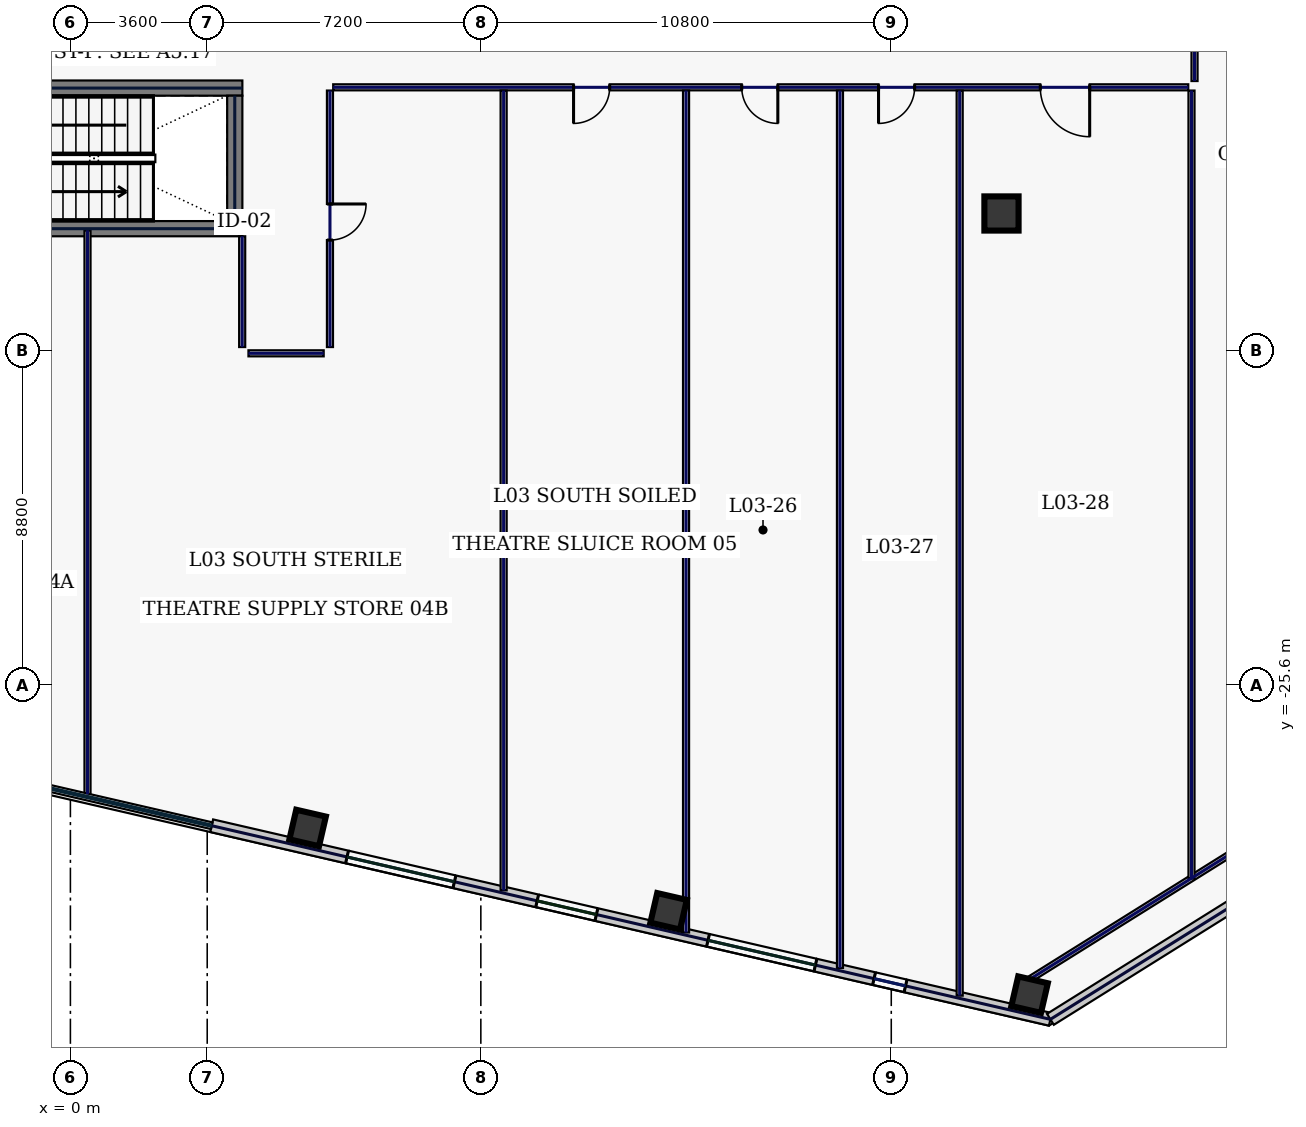
"""IFC4 building model, lengths in metres.
Left out: names, types, materials, properties, quantities, classifications, styles, units other than length and angle.
Written with IfcOpenShell. Run it as: python <this file> out.ifc"""

import sys

from ifc_helpers import new_model, si_unit, direction, frame, frame_2d, origin, origin_2d, place, context, subcontext, project, spatial, rectangle, hollow_rectangle, extrude, element, fill, save


model = new_model("IFC4")
c1 = context("Model", 3, precision=1e-05, world=origin(), true_north=direction((0.0, 1.0)))
c2 = subcontext(c1, "Body", "Model", "MODEL_VIEW")
j1 = project(units=[si_unit("LENGTHUNIT", "METRE"), si_unit("PLANEANGLEUNIT", "RADIAN")], contexts=[c1])
p1 = place(None, origin())
s1 = spatial("IfcSite", under=j1, at=p1, CompositionType="ELEMENT")
p2 = place(p1, origin())
s2 = spatial("IfcBuilding", under=s1, at=p2, CompositionType="ELEMENT")
p3 = place(p2, frame((0.0, 0.0, 18.4)))
s3 = spatial("IfcBuildingStorey", under=s2, at=p3, CompositionType="ELEMENT", Elevation=18.4)
p4 = place(p3, frame((-4.525, -13.6, 0.0), z_axis=(0.0, 0.0, 1.0), x_axis=(1.0, 0.0, 0.0)))
e1 = element("IfcWall", 1, at=p4, inside=s3, PredefinedType="SHEAR", context=c2, shape_type="SweptSolid", body=[
    extrude(rectangle(XDim=9.05, YDim=0.4, at=frame_2d((4.525, 0.0))), origin(), (0.0, 0.0, 1.0), 4.7),
])
p5 = place(p3, frame((-4.525, -9.9, 0.0), z_axis=(0.0, 0.0, 1.0), x_axis=(1.0, 0.0, 0.0)))
e2 = element("IfcWall", 2, at=p5, inside=s3, PredefinedType="SHEAR", context=c2, shape_type="SweptSolid", body=[
    extrude(rectangle(XDim=9.05, YDim=0.4, at=frame_2d((4.525, 0.0))), origin(), (0.0, 0.0, 1.0), 4.7),
])
p6 = place(p5, frame((0.25, 0.0, 0.0)))
e3 = element("IfcOpeningElement", 3, at=p6, cuts=e2, PredefinedType="OPENING", context=c2, shape_type="SweptSolid", body=[
    extrude(rectangle(XDim=1.1, YDim=2.2, at=frame_2d((0.55, 1.1))), frame((0.0, 0.21, 0.0), z_axis=(0.0, -1.0, 0.0), x_axis=(1.0, 0.0, 0.0)), (0.0, 0.0, 1.0), 0.42),
])
p7 = place(p3, frame((4.325, -13.4, 0.0), z_axis=(0.0, 0.0, 1.0), x_axis=(0.0, 1.0, 0.0)))
e4 = element("IfcWall", 4, at=p7, inside=s3, PredefinedType="SHEAR", context=c2, shape_type="SweptSolid", body=[
    extrude(rectangle(XDim=3.3, YDim=0.4, at=frame_2d((1.65, 0.0))), origin(), (0.0, 0.0, 1.0), 4.7),
])
p8 = place(p3, frame((24.5, -13.2, 0.0), z_axis=(0.0, 0.0, 1.0), x_axis=(1.0, 0.0, 0.0)))
e5 = element("IfcColumn", 5, at=p8, inside=s3, PredefinedType="COLUMN", context=c2, shape_type="SweptSolid", body=[
    extrude(hollow_rectangle(XDim=0.9, YDim=0.9, WallThickness=0.04, at=origin_2d()), origin(), (0.0, 0.0, 1.0), 4.7),
])
for number, where, z_axis, x_axis in (
    (6, (6.242, -29.371, 0.0), (0.0, 0.0, 1.0), (0.974, -0.225, 0.0)),
    (7, (15.741, -31.564, 0.0), (0.0, 0.0, 1.0), (0.974, -0.225, 0.0)),
    (8, (25.24, -33.757, 0.0), (0.0, 0.0, 1.0), (0.974, -0.225, 0.0)),
):
    element("IfcColumn", number, at=place(p3, frame(where, z_axis=z_axis, x_axis=x_axis)), inside=s3, PredefinedType="COLUMN", context=c2, shape_type="SweptSolid", body=[
        extrude(hollow_rectangle(XDim=0.8, YDim=0.8, WallThickness=0.036, at=origin_2d()), origin(), (0.0, 0.0, 1.0), 4.7),
    ])
p9 = place(p3, frame((3.717, -29.311, 0.0), z_axis=(0.0, 0.0, 1.0), x_axis=(0.97436993772, -0.224951604723, 0.0)))
e9 = element("IfcWall", 9, at=p9, inside=s3, PredefinedType="STANDARD", context=c2, shape_type="SweptSolid", body=[
    extrude(rectangle(XDim=22.651, YDim=0.34, at=frame_2d((11.326, 0.0))), origin(), (0.0, 0.0, 1.0), 4.7),
])
p10 = place(p9, frame((3.656, 0.0, 0.85)))
e10 = element("IfcOpeningElement", 10, at=p10, cuts=e9, PredefinedType="OPENING", context=c2, shape_type="SweptSolid", body=[
    extrude(rectangle(XDim=2.9, YDim=2.3, at=frame_2d((1.45, 1.15))), frame((0.0, 0.18, 0.0), z_axis=(0.0, -1.0, 0.0), x_axis=(1.0, 0.0, 0.0)), (0.0, 0.0, 1.0), 0.36),
])
p11 = place(p9, frame((8.791, 0.0, 0.22)))
e11 = element("IfcOpeningElement", 11, at=p11, cuts=e9, PredefinedType="OPENING", context=c2, shape_type="SweptSolid", body=[
    extrude(rectangle(XDim=1.6, YDim=1.2, at=frame_2d((0.8, 0.6))), frame((0.0, 0.18, 0.0), z_axis=(0.0, -1.0, 0.0), x_axis=(1.0, 0.0, 0.0)), (0.0, 0.0, 1.0), 0.36),
])
p12 = place(p9, frame((13.405, 0.0, 0.85)))
e12 = element("IfcOpeningElement", 12, at=p12, cuts=e9, PredefinedType="OPENING", context=c2, shape_type="SweptSolid", body=[
    extrude(rectangle(XDim=2.9, YDim=2.3, at=frame_2d((1.45, 1.15))), frame((0.0, 0.18, 0.0), z_axis=(0.0, -1.0, 0.0), x_axis=(1.0, 0.0, 0.0)), (0.0, 0.0, 1.0), 0.36),
])
p13 = place(p9, frame((17.889, 0.0, 0.85)))
e13 = element("IfcOpeningElement", 13, at=p13, cuts=e9, PredefinedType="OPENING", context=c2, shape_type="SweptSolid", body=[
    extrude(rectangle(XDim=0.85, YDim=1.85, at=frame_2d((0.425, 0.925))), frame((0.0, 0.18, 0.0), z_axis=(0.0, -1.0, 0.0), x_axis=(1.0, 0.0, 0.0)), (0.0, 0.0, 1.0), 0.36),
])
p14 = place(p3, frame((25.788, -34.406, 0.0), z_axis=(0.0, 0.0, 1.0), x_axis=(0.848046504656, 0.529921811158, 0.0)))
e14 = element("IfcWall", 14, at=p14, inside=s3, PredefinedType="STANDARD", context=c2, shape_type="SweptSolid", body=[
    extrude(rectangle(XDim=7.113, YDim=0.34, at=frame_2d((3.557, 0.0))), origin(), (0.0, 0.0, 1.0), 4.7),
])
p15 = place(p3, frame((25.06, -33.468, 0.0), z_axis=(0.0, 0.0, 1.0), x_axis=(0.848043064089, 0.529927317139, 0.0)))
e15 = element("IfcWall", 15, at=p15, inside=s3, PredefinedType="PARTITIONING", context=c2, shape_type="SweptSolid", body=[
    extrude(rectangle(XDim=7.354, YDim=0.16, at=frame_2d((3.677, 0.0))), origin(), (0.0, 0.0, 1.0), 4.7),
])
p16 = place(p3, frame((29.58, 9.715, 0.0), z_axis=(0.0, 0.0, 1.0), x_axis=(0.0, -1.0, 0.0)))
e16 = element("IfcWall", 16, at=p16, inside=s3, PredefinedType="PARTITIONING", context=c2, shape_type="SweptSolid", body=[
    extrude(rectangle(XDim=19.43, YDim=0.16, at=frame_2d((9.715, 0.0))), origin(), (0.0, 0.0, 1.0), 4.7),
])
p17 = place(p16, frame((16.631, 0.0, 0.0)))
e17 = element("IfcOpeningElement", 17, at=p17, cuts=e16, PredefinedType="OPENING", context=c2, shape_type="SweptSolid", body=[
    extrude(rectangle(XDim=0.95, YDim=2.2, at=frame_2d((0.475, 1.1))), frame((0.0, 0.09, 0.0), z_axis=(0.0, -1.0, 0.0), x_axis=(1.0, 0.0, 0.0)), (0.0, 0.0, 1.0), 0.18),
])
p18 = place(p16, frame((11.925, 0.0, 0.0)))
e18 = element("IfcOpeningElement", 18, at=p18, cuts=e16, PredefinedType="OPENING", context=c2, shape_type="SweptSolid", body=[
    extrude(rectangle(XDim=0.95, YDim=2.2, at=frame_2d((0.475, 1.1))), frame((0.0, 0.09, 0.0), z_axis=(0.0, -1.0, 0.0), x_axis=(1.0, 0.0, 0.0)), (0.0, 0.0, 1.0), 0.18),
])
p19 = place(p16, frame((6.725, 0.0, 0.0)))
e19 = element("IfcOpeningElement", 19, at=p19, cuts=e16, PredefinedType="OPENING", context=c2, shape_type="SweptSolid", body=[
    extrude(rectangle(XDim=0.95, YDim=2.2, at=frame_2d((0.475, 1.1))), frame((0.0, 0.09, 0.0), z_axis=(0.0, -1.0, 0.0), x_axis=(1.0, 0.0, 0.0)), (0.0, 0.0, 1.0), 0.18),
])
p20 = place(p16, frame((2.019, 0.0, 0.0)))
e20 = element("IfcOpeningElement", 20, at=p20, cuts=e16, PredefinedType="OPENING", context=c2, shape_type="SweptSolid", body=[
    extrude(rectangle(XDim=0.95, YDim=2.2, at=frame_2d((0.475, 1.1))), frame((0.0, 0.09, 0.0), z_axis=(0.0, -1.0, 0.0), x_axis=(1.0, 0.0, 0.0)), (0.0, 0.0, 1.0), 0.18),
])
p21 = place(p3, frame((29.415, -9.88, 0.0), z_axis=(0.0, 0.0, 1.0), x_axis=(-1.0, 0.0, 0.0)))
e21 = element("IfcWall", 21, at=p21, inside=s3, PredefinedType="PARTITIONING", context=c2, shape_type="SweptSolid", body=[
    extrude(rectangle(XDim=22.5, YDim=0.16, at=frame_2d((11.25, 0.0))), origin(), (0.0, 0.0, 1.0), 4.7),
])
p22 = place(p21, frame((15.225, 0.0, 0.0)))
e22 = element("IfcOpeningElement", 22, at=p22, cuts=e21, PredefinedType="OPENING", context=c2, shape_type="SweptSolid", body=[
    extrude(rectangle(XDim=0.95, YDim=2.2, at=frame_2d((0.475, 1.1))), frame((0.0, 0.09, 0.0), z_axis=(0.0, -1.0, 0.0), x_axis=(1.0, 0.0, 0.0)), (0.0, 0.0, 1.0), 0.18),
])
p23 = place(p21, frame((10.8, 0.0, 0.0)))
e23 = element("IfcOpeningElement", 23, at=p23, cuts=e21, PredefinedType="OPENING", context=c2, shape_type="SweptSolid", body=[
    extrude(rectangle(XDim=0.95, YDim=2.2, at=frame_2d((0.475, 1.1))), frame((0.0, 0.09, 0.0), z_axis=(0.0, -1.0, 0.0), x_axis=(1.0, 0.0, 0.0)), (0.0, 0.0, 1.0), 0.18),
])
p24 = place(p21, frame((7.2, 0.0, 0.0)))
e24 = element("IfcOpeningElement", 24, at=p24, cuts=e21, PredefinedType="OPENING", context=c2, shape_type="SweptSolid", body=[
    extrude(rectangle(XDim=0.95, YDim=2.2, at=frame_2d((0.475, 1.1))), frame((0.0, 0.09, 0.0), z_axis=(0.0, -1.0, 0.0), x_axis=(1.0, 0.0, 0.0)), (0.0, 0.0, 1.0), 0.18),
])
p25 = place(p21, frame((2.594, 0.0, 0.0)))
e25 = element("IfcOpeningElement", 25, at=p25, cuts=e21, PredefinedType="OPENING", context=c2, shape_type="SweptSolid", body=[
    extrude(rectangle(XDim=1.3, YDim=2.2, at=frame_2d((0.65, 1.1))), frame((0.0, 0.09, 0.0), z_axis=(0.0, -1.0, 0.0), x_axis=(1.0, 0.0, 0.0)), (0.0, 0.0, 1.0), 0.18),
])
p26 = place(p3, frame((6.83, -9.965, 0.0), z_axis=(0.0, 0.0, 1.0), x_axis=(0.0, -1.0, 0.0)))
e26 = element("IfcWall", 26, at=p26, inside=s3, PredefinedType="PARTITIONING", context=c2, shape_type="SweptSolid", body=[
    extrude(rectangle(XDim=6.75, YDim=0.16, at=frame_2d((3.375, 0.0))), origin(), (0.0, 0.0, 1.0), 4.7),
])
p27 = place(p26, frame((2.985, 0.0, 0.0)))
e27 = element("IfcOpeningElement", 27, at=p27, cuts=e26, PredefinedType="OPENING", context=c2, shape_type="SweptSolid", body=[
    extrude(rectangle(XDim=0.95, YDim=2.2, at=frame_2d((0.475, 1.1))), frame((0.0, 0.09, 0.0), z_axis=(0.0, -1.0, 0.0), x_axis=(1.0, 0.0, 0.0)), (0.0, 0.0, 1.0), 0.18),
])
p28 = place(p3, frame((6.665, -16.88, 0.0), z_axis=(0.0, 0.0, 1.0), x_axis=(-1.0, 0.0, 0.0)))
e28 = element("IfcWall", 28, at=p28, inside=s3, PredefinedType="PARTITIONING", context=c2, shape_type="SweptSolid", body=[
    extrude(rectangle(XDim=1.98, YDim=0.16, at=frame_2d((0.99, 0.0))), origin(), (0.0, 0.0, 1.0), 4.7),
])
p29 = place(p3, frame((4.52, -16.715, 0.0), z_axis=(0.0, 0.0, 1.0), x_axis=(0.0, 1.0, 0.0)))
e29 = element("IfcWall", 29, at=p29, inside=s3, PredefinedType="PARTITIONING", context=c2, shape_type="SweptSolid", body=[
    extrude(rectangle(XDim=2.915, YDim=0.16, at=frame_2d((1.458, 0.0))), origin(), (0.0, 0.0, 1.0), 4.7),
])
p30 = place(p3, frame((29.5, -30.703, 0.0), z_axis=(0.0, 0.0, 1.0), x_axis=(0.0, 1.0, 0.0)))
e30 = element("IfcWall", 30, at=p30, inside=s3, PredefinedType="PARTITIONING", context=c2, shape_type="SweptSolid", body=[
    extrude(rectangle(XDim=20.738, YDim=0.16, at=frame_2d((10.369, 0.0))), origin(), (0.0, 0.0, 1.0), 4.7),
])
p31 = place(p3, frame((11.4, -31.013, 0.0), z_axis=(0.0, 0.0, 1.0), x_axis=(0.0, 1.0, 0.0)))
e31 = element("IfcWall", 31, at=p31, inside=s3, PredefinedType="PARTITIONING", context=c2, shape_type="SweptSolid", body=[
    extrude(rectangle(XDim=21.048, YDim=0.16, at=frame_2d((10.524, 0.0))), origin(), (0.0, 0.0, 1.0), 4.7),
])
p32 = place(p3, frame((16.2, -32.121, 0.0), z_axis=(0.0, 0.0, 1.0), x_axis=(0.0, 1.0, 0.0)))
e32 = element("IfcWall", 32, at=p32, inside=s3, PredefinedType="PARTITIONING", context=c2, shape_type="SweptSolid", body=[
    extrude(rectangle(XDim=22.156, YDim=0.16, at=frame_2d((11.078, 0.0))), origin(), (0.0, 0.0, 1.0), 4.7),
])
p33 = place(p3, frame((23.4, -33.783, 0.0), z_axis=(0.0, 0.0, 1.0), x_axis=(0.0, 1.0, 0.0)))
e33 = element("IfcWall", 33, at=p33, inside=s3, PredefinedType="PARTITIONING", context=c2, shape_type="SweptSolid", body=[
    extrude(rectangle(XDim=23.818, YDim=0.16, at=frame_2d((11.909, 0.0))), origin(), (0.0, 0.0, 1.0), 4.7),
])
p34 = place(p3, frame((0.45, -28.485, 0.0), z_axis=(0.0, 0.0, 1.0), x_axis=(0.0, 1.0, 0.0)))
e34 = element("IfcWall", 34, at=p34, inside=s3, PredefinedType="PARTITIONING", context=c2, shape_type="SweptSolid", body=[
    extrude(rectangle(XDim=14.845, YDim=0.16, at=frame_2d((7.423, 0.0))), origin(), (0.0, 0.0, 1.0), 4.7),
])
p35 = place(p3, frame((20.25, -33.056, 0.0), z_axis=(0.0, 0.0, 1.0), x_axis=(0.0, 1.0, 0.0)))
e35 = element("IfcWall", 35, at=p35, inside=s3, PredefinedType="PARTITIONING", context=c2, shape_type="SweptSolid", body=[
    extrude(rectangle(XDim=23.091, YDim=0.16, at=frame_2d((11.545, 0.0))), origin(), (0.0, 0.0, 1.0), 4.7),
])
p36 = place(p10, origin())
e36 = element("IfcWindow", 36, at=p36, inside=s3, PartitioningType="SINGLE_PANEL", PredefinedType="WINDOW", context=c2, shape_type="SweptSolid", body=[
    extrude(rectangle(XDim=2.9, YDim=2.3, at=frame_2d((1.45, 1.15))), frame((0.0, 0.03, 0.0), z_axis=(0.0, -1.0, 0.0), x_axis=(1.0, 0.0, 0.0)), (0.0, 0.0, 1.0), 0.06),
])
fill(e10, e36)
p37 = place(p11, origin())
e37 = element("IfcWindow", 37, at=p37, inside=s3, PartitioningType="SINGLE_PANEL", PredefinedType="WINDOW", context=c2, shape_type="SweptSolid", body=[
    extrude(rectangle(XDim=1.6, YDim=1.2, at=frame_2d((0.8, 0.6))), frame((0.0, 0.03, 0.0), z_axis=(0.0, -1.0, 0.0), x_axis=(1.0, 0.0, 0.0)), (0.0, 0.0, 1.0), 0.06),
])
fill(e11, e37)
p38 = place(p12, origin())
e38 = element("IfcWindow", 38, at=p38, inside=s3, PartitioningType="SINGLE_PANEL", PredefinedType="WINDOW", context=c2, shape_type="SweptSolid", body=[
    extrude(rectangle(XDim=2.9, YDim=2.3, at=frame_2d((1.45, 1.15))), frame((0.0, 0.03, 0.0), z_axis=(0.0, -1.0, 0.0), x_axis=(1.0, 0.0, 0.0)), (0.0, 0.0, 1.0), 0.06),
])
fill(e12, e38)
p39 = place(p13, origin())
e39 = element("IfcWindow", 39, at=p39, inside=s3, PartitioningType="SINGLE_PANEL", PredefinedType="WINDOW", context=c2, shape_type="SweptSolid", body=[
    extrude(rectangle(XDim=0.85, YDim=1.85, at=frame_2d((0.425, 0.925))), frame((0.0, 0.03, 0.0), z_axis=(0.0, -1.0, 0.0), x_axis=(1.0, 0.0, 0.0)), (0.0, 0.0, 1.0), 0.06),
])
fill(e13, e39)
p40 = place(p27, origin())
e40 = element("IfcDoor", 40, at=p40, inside=s3, OperationType="SINGLE_SWING_LEFT", PredefinedType="DOOR", context=c2, shape_type="SweptSolid", body=[
    extrude(rectangle(XDim=0.95, YDim=2.2, at=frame_2d((0.475, 1.1))), frame((0.0, 0.025, 0.0), z_axis=(0.0, -1.0, 0.0), x_axis=(1.0, 0.0, 0.0)), (0.0, 0.0, 1.0), 0.05),
])
fill(e27, e40)
p41 = place(p22, origin())
e41 = element("IfcDoor", 41, at=p41, inside=s3, OperationType="SINGLE_SWING_RIGHT", PredefinedType="DOOR", context=c2, shape_type="SweptSolid", body=[
    extrude(rectangle(XDim=0.95, YDim=2.2, at=frame_2d((0.475, 1.1))), frame((0.0, 0.025, 0.0), z_axis=(0.0, -1.0, 0.0), x_axis=(1.0, 0.0, 0.0)), (0.0, 0.0, 1.0), 0.05),
])
fill(e22, e41)
p42 = place(p23, origin())
e42 = element("IfcDoor", 42, at=p42, inside=s3, OperationType="SINGLE_SWING_LEFT", PredefinedType="DOOR", context=c2, shape_type="SweptSolid", body=[
    extrude(rectangle(XDim=0.95, YDim=2.2, at=frame_2d((0.475, 1.1))), frame((0.0, 0.025, 0.0), z_axis=(0.0, -1.0, 0.0), x_axis=(1.0, 0.0, 0.0)), (0.0, 0.0, 1.0), 0.05),
])
fill(e23, e42)
p43 = place(p24, origin())
e43 = element("IfcDoor", 43, at=p43, inside=s3, OperationType="SINGLE_SWING_RIGHT", PredefinedType="DOOR", context=c2, shape_type="SweptSolid", body=[
    extrude(rectangle(XDim=0.95, YDim=2.2, at=frame_2d((0.475, 1.1))), frame((0.0, 0.025, 0.0), z_axis=(0.0, -1.0, 0.0), x_axis=(1.0, 0.0, 0.0)), (0.0, 0.0, 1.0), 0.05),
])
fill(e24, e43)
p44 = place(p25, origin())
e44 = element("IfcDoor", 44, at=p44, inside=s3, OperationType="SINGLE_SWING_LEFT", PredefinedType="DOOR", context=c2, shape_type="SweptSolid", body=[
    extrude(rectangle(XDim=1.3, YDim=2.2, at=frame_2d((0.65, 1.1))), frame((0.0, 0.025, 0.0), z_axis=(0.0, -1.0, 0.0), x_axis=(1.0, 0.0, 0.0)), (0.0, 0.0, 1.0), 0.05),
])
fill(e25, e44)
save(model, sys.argv[1])
